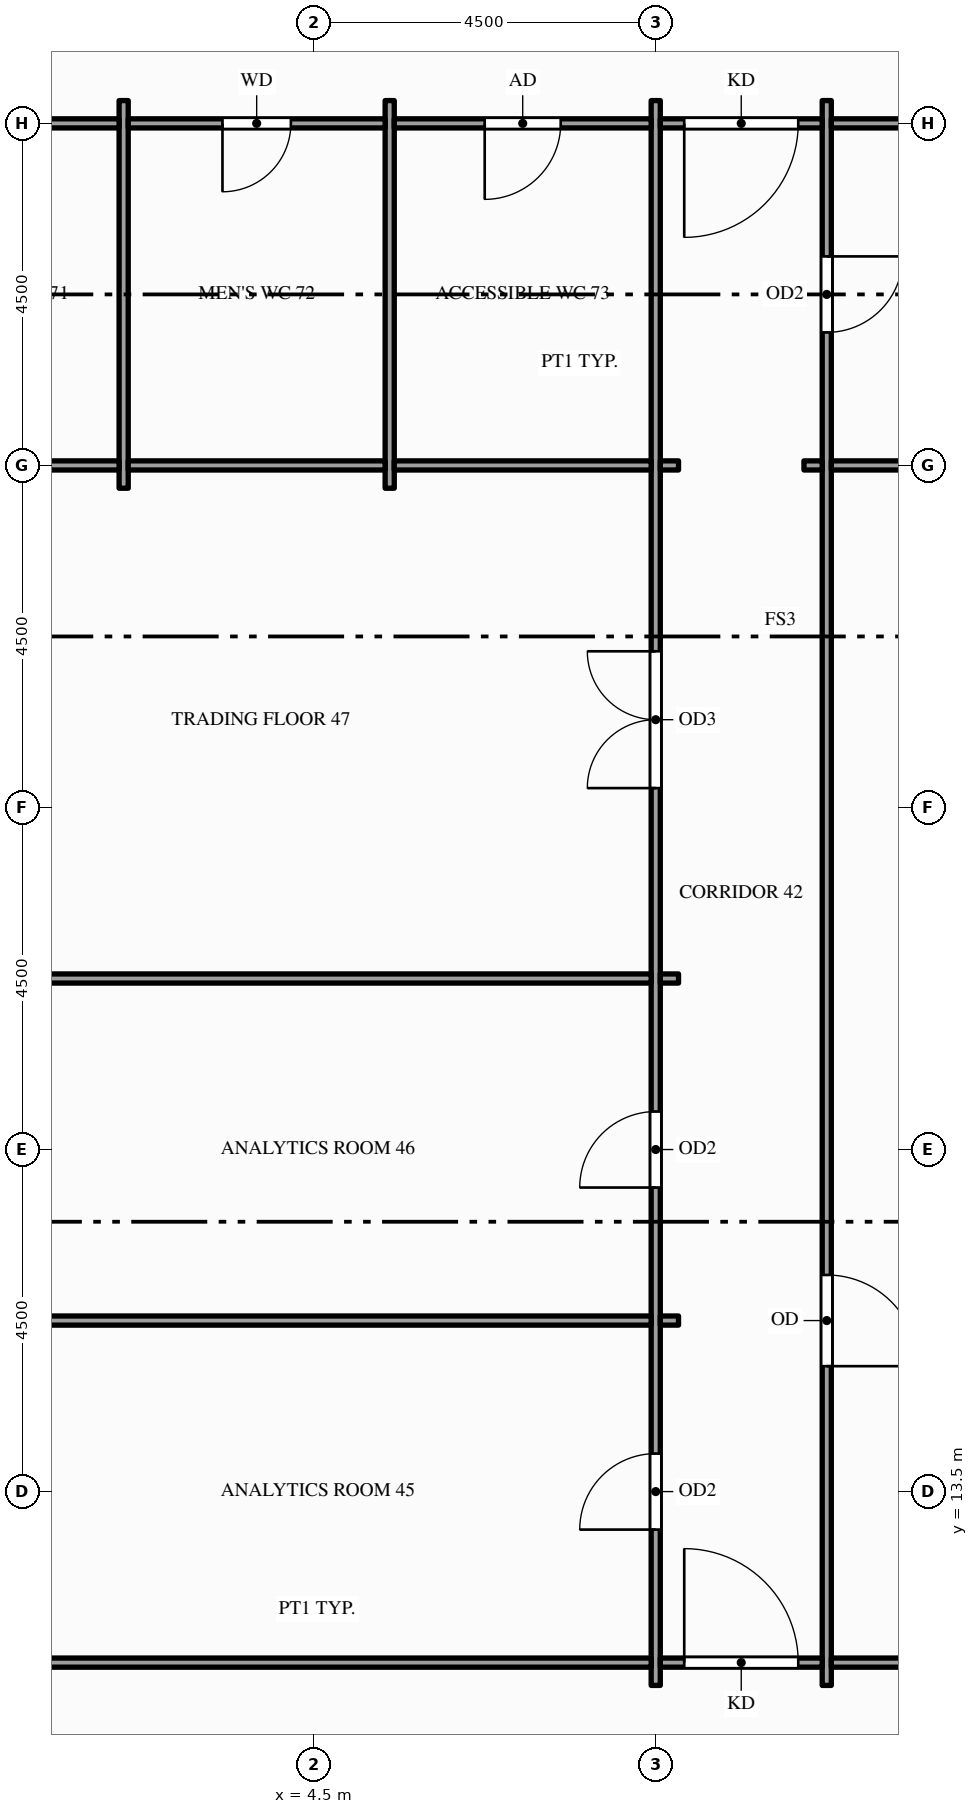
"""IFC4 building model, lengths in metres.
Left out: names, types, materials, properties, quantities, classifications, styles, units other than length and angle.
Written with IfcOpenShell. Run it as: python <this file> out.ifc"""

import sys

from ifc_helpers import new_model, si_unit, direction, frame, frame_2d, origin, place, context, subcontext, project, spatial, rectangle, extrude, element, fill, save


model = new_model("IFC4")
c1 = context("Model", 3, precision=1e-05, world=origin(), true_north=direction((0.0, 1.0)))
c2 = subcontext(c1, "Body", "Model", "MODEL_VIEW")
j1 = project(units=[si_unit("LENGTHUNIT", "METRE"), si_unit("PLANEANGLEUNIT", "RADIAN")], contexts=[c1])
p1 = place(None, origin())
s1 = spatial("IfcSite", under=j1, at=p1, CompositionType="ELEMENT")
p2 = place(p1, origin())
s2 = spatial("IfcBuilding", under=s1, at=p2, CompositionType="ELEMENT")
p3 = place(p2, frame((0.0, 0.0, 159.0)))
s3 = spatial("IfcBuildingStorey", under=s2, at=p3, CompositionType="ELEMENT", Elevation=159.0)
for number, where, z_axis, x_axis in (
    (1, (2.0, 26.7, 0.0), (0.0, 0.0, 1.0), (0.0, 1.0, 0.0)),
    (2, (5.5, 26.7, 0.0), (0.0, 0.0, 1.0), (0.0, 1.0, 0.0)),
):
    element("IfcWall", number, at=place(p3, frame(where, z_axis=z_axis, x_axis=x_axis)), inside=s3, PredefinedType="PARTITIONING", context=c2, shape_type="SweptSolid", body=[
        extrude(rectangle(XDim=5.1, YDim=0.12, at=frame_2d((2.55, 0.0))), origin(), (0.0, 0.0, 1.0), 3.85),
    ])
p4 = place(p3, frame((9.0, 10.95, 0.0), z_axis=(0.0, 0.0, 1.0), x_axis=(0.0, 1.0, 0.0)))
e3 = element("IfcWall", 3, at=p4, inside=s3, PredefinedType="PARTITIONING", context=c2, shape_type="SweptSolid", body=[
    extrude(rectangle(XDim=20.85, YDim=0.12, at=frame_2d((10.425, 0.0))), origin(), (0.0, 0.0, 1.0), 2.6),
])
p5 = place(p4, frame((2.05, 0.0, 0.0)))
e4 = element("IfcOpeningElement", 4, at=p5, cuts=e3, PredefinedType="OPENING", context=c2, shape_type="SweptSolid", body=[
    extrude(rectangle(XDim=1.0, YDim=2.1, at=frame_2d((0.5, 1.05))), frame((0.0, 0.07, 0.0), z_axis=(0.0, -1.0, 0.0), x_axis=(1.0, 0.0, 0.0)), (0.0, 0.0, 1.0), 0.14),
])
p6 = place(p4, frame((6.55, 0.0, 0.0)))
e5 = element("IfcOpeningElement", 5, at=p6, cuts=e3, PredefinedType="OPENING", context=c2, shape_type="SweptSolid", body=[
    extrude(rectangle(XDim=1.0, YDim=2.1, at=frame_2d((0.5, 1.05))), frame((0.0, 0.07, 0.0), z_axis=(0.0, -1.0, 0.0), x_axis=(1.0, 0.0, 0.0)), (0.0, 0.0, 1.0), 0.14),
])
p7 = place(p4, frame((11.805, 0.0, 0.0)))
e6 = element("IfcOpeningElement", 6, at=p7, cuts=e3, PredefinedType="OPENING", context=c2, shape_type="SweptSolid", body=[
    extrude(rectangle(XDim=1.8, YDim=2.1, at=frame_2d((0.9, 1.05))), frame((0.0, 0.07, 0.0), z_axis=(0.0, -1.0, 0.0), x_axis=(1.0, 0.0, 0.0)), (0.0, 0.0, 1.0), 0.14),
])
p8 = place(p3, frame((11.25, 10.95, 0.0), z_axis=(0.0, 0.0, 1.0), x_axis=(0.0, 1.0, 0.0)))
e7 = element("IfcWall", 7, at=p8, inside=s3, PredefinedType="PARTITIONING", context=c2, shape_type="SweptSolid", body=[
    extrude(rectangle(XDim=20.85, YDim=0.12, at=frame_2d((10.425, 0.0))), origin(), (0.0, 0.0, 1.0), 2.6),
])
p9 = place(p8, frame((17.8, 0.0, 0.0)))
e8 = element("IfcOpeningElement", 8, at=p9, cuts=e7, PredefinedType="OPENING", context=c2, shape_type="SweptSolid", body=[
    extrude(rectangle(XDim=1.0, YDim=2.1, at=frame_2d((0.5, 1.05))), frame((0.0, 0.07, 0.0), z_axis=(0.0, -1.0, 0.0), x_axis=(1.0, 0.0, 0.0)), (0.0, 0.0, 1.0), 0.14),
])
p10 = place(p8, frame((4.2, 0.0, 0.0)))
e9 = element("IfcOpeningElement", 9, at=p10, cuts=e7, PredefinedType="OPENING", context=c2, shape_type="SweptSolid", body=[
    extrude(rectangle(XDim=1.2, YDim=2.1, at=frame_2d((0.6, 1.05))), frame((0.0, 0.07, 0.0), z_axis=(0.0, -1.0, 0.0), x_axis=(1.0, 0.0, 0.0)), (0.0, 0.0, 1.0), 0.14),
])
p11 = place(p3, frame((0.15, 11.25, 0.0), z_axis=(0.0, 0.0, 1.0), x_axis=(1.0, 0.0, 0.0)))
e10 = element("IfcWall", 10, at=p11, inside=s3, PredefinedType="PARTITIONING", context=c2, shape_type="SweptSolid", body=[
    extrude(rectangle(XDim=8.79, YDim=0.12, at=frame_2d((4.395, 0.0))), origin(), (0.0, 0.0, 1.0), 2.87),
])
p12 = place(p3, frame((9.06, 11.25, 0.0), z_axis=(0.0, 0.0, 1.0), x_axis=(1.0, 0.0, 0.0)))
e11 = element("IfcWall", 11, at=p12, inside=s3, PredefinedType="PARTITIONING", context=c2, shape_type="SweptSolid", body=[
    extrude(rectangle(XDim=2.13, YDim=0.12, at=frame_2d((1.065, 0.0))), origin(), (0.0, 0.0, 1.0), 2.87),
])
p13 = place(p12, frame((0.315, 0.0, 0.0)))
e12 = element("IfcOpeningElement", 12, at=p13, cuts=e11, PredefinedType="OPENING", context=c2, shape_type="SweptSolid", body=[
    extrude(rectangle(XDim=1.5, YDim=2.1, at=frame_2d((0.75, 1.05))), frame((0.0, 0.07, 0.0), z_axis=(0.0, -1.0, 0.0), x_axis=(1.0, 0.0, 0.0)), (0.0, 0.0, 1.0), 0.14),
])
p14 = place(p3, frame((11.31, 11.25, 0.0), z_axis=(0.0, 0.0, 1.0), x_axis=(1.0, 0.0, 0.0)))
e13 = element("IfcWall", 13, at=p14, inside=s3, PredefinedType="PARTITIONING", context=c2, shape_type="SweptSolid", body=[
    extrude(rectangle(XDim=13.38, YDim=0.12, at=frame_2d((6.69, 0.0))), origin(), (0.0, 0.0, 1.0), 2.87),
])
p15 = place(p14, frame((3.54, 0.0, 0.0)))
e14 = element("IfcOpeningElement", 14, at=p15, cuts=e13, PredefinedType="OPENING", context=c2, shape_type="SweptSolid", body=[
    extrude(rectangle(XDim=1.8, YDim=2.1, at=frame_2d((0.9, 1.05))), frame((0.0, 0.07, 0.0), z_axis=(0.0, -1.0, 0.0), x_axis=(1.0, 0.0, 0.0)), (0.0, 0.0, 1.0), 0.14),
])
p16 = place(p3, frame((0.15, 15.75, 0.0), z_axis=(0.0, 0.0, 1.0), x_axis=(1.0, 0.0, 0.0)))
e15 = element("IfcWall", 15, at=p16, inside=s3, PredefinedType="PARTITIONING", context=c2, shape_type="SweptSolid", body=[
    extrude(rectangle(XDim=8.79, YDim=0.12, at=frame_2d((4.395, 0.0))), origin(), (0.0, 0.0, 1.0), 2.87),
])
p17 = place(p3, frame((9.06, 15.75, 0.0), z_axis=(0.0, 0.0, 1.0), x_axis=(1.0, 0.0, 0.0)))
e16 = element("IfcWall", 16, at=p17, inside=s3, PredefinedType="PARTITIONING", context=c2, shape_type="SweptSolid", body=[
    extrude(rectangle(XDim=0.24, YDim=0.12, at=frame_2d((0.12, 0.0))), origin(), (0.0, 0.0, 1.0), 2.87),
])
p18 = place(p3, frame((0.15, 20.25, 0.0), z_axis=(0.0, 0.0, 1.0), x_axis=(1.0, 0.0, 0.0)))
e17 = element("IfcWall", 17, at=p18, inside=s3, PredefinedType="PARTITIONING", context=c2, shape_type="SweptSolid", body=[
    extrude(rectangle(XDim=8.79, YDim=0.12, at=frame_2d((4.395, 0.0))), origin(), (0.0, 0.0, 1.0), 2.87),
])
p19 = place(p3, frame((9.06, 20.25, 0.0), z_axis=(0.0, 0.0, 1.0), x_axis=(1.0, 0.0, 0.0)))
e18 = element("IfcWall", 18, at=p19, inside=s3, PredefinedType="PARTITIONING", context=c2, shape_type="SweptSolid", body=[
    extrude(rectangle(XDim=0.24, YDim=0.12, at=frame_2d((0.12, 0.0))), origin(), (0.0, 0.0, 1.0), 2.87),
])
p20 = place(p3, frame((-1.35, 27.0, 0.0), z_axis=(0.0, 0.0, 1.0), x_axis=(1.0, 0.0, 0.0)))
e19 = element("IfcWall", 19, at=p20, inside=s3, PredefinedType="PARTITIONING", context=c2, shape_type="SweptSolid", body=[
    extrude(rectangle(XDim=3.29, YDim=0.12, at=frame_2d((1.645, 0.0))), origin(), (0.0, 0.0, 1.0), 2.87),
])
for number, where, z_axis, x_axis in (
    (20, (2.06, 27.0, 0.0), (0.0, 0.0, 1.0), (1.0, 0.0, 0.0)),
    (21, (5.56, 27.0, 0.0), (0.0, 0.0, 1.0), (1.0, 0.0, 0.0)),
):
    element("IfcWall", number, at=place(p3, frame(where, z_axis=z_axis, x_axis=x_axis)), inside=s3, PredefinedType="PARTITIONING", context=c2, shape_type="SweptSolid", body=[
        extrude(rectangle(XDim=3.38, YDim=0.12, at=frame_2d((1.69, 0.0))), origin(), (0.0, 0.0, 1.0), 2.87),
    ])
for number, where, z_axis, x_axis in (
    (22, (9.06, 27.0, 0.0), (0.0, 0.0, 1.0), (1.0, 0.0, 0.0)),
    (23, (10.95, 27.0, 0.0), (0.0, 0.0, 1.0), (1.0, 0.0, 0.0)),
):
    element("IfcWall", number, at=place(p3, frame(where, z_axis=z_axis, x_axis=x_axis)), inside=s3, PredefinedType="PARTITIONING", context=c2, shape_type="SweptSolid", body=[
        extrude(rectangle(XDim=0.24, YDim=0.12, at=frame_2d((0.12, 0.0))), origin(), (0.0, 0.0, 1.0), 2.87),
    ])
p21 = place(p3, frame((11.31, 27.0, 0.0), z_axis=(0.0, 0.0, 1.0), x_axis=(1.0, 0.0, 0.0)))
e24 = element("IfcWall", 24, at=p21, inside=s3, PredefinedType="PARTITIONING", context=c2, shape_type="SweptSolid", body=[
    extrude(rectangle(XDim=9.82, YDim=0.12, at=frame_2d((4.91, 0.0))), origin(), (0.0, 0.0, 1.0), 2.87),
])
p22 = place(p3, frame((-1.35, 31.5, 0.0), z_axis=(0.0, 0.0, 1.0), x_axis=(1.0, 0.0, 0.0)))
e25 = element("IfcWall", 25, at=p22, inside=s3, PredefinedType="PARTITIONING", context=c2, shape_type="SweptSolid", body=[
    extrude(rectangle(XDim=3.29, YDim=0.12, at=frame_2d((1.645, 0.0))), origin(), (0.0, 0.0, 1.0), 2.87),
])
p23 = place(p22, frame((0.85, 0.0, 0.0)))
e26 = element("IfcOpeningElement", 26, at=p23, cuts=e25, PredefinedType="OPENING", context=c2, shape_type="SweptSolid", body=[
    extrude(rectangle(XDim=0.9, YDim=2.1, at=frame_2d((0.45, 1.05))), frame((0.0, 0.07, 0.0), z_axis=(0.0, -1.0, 0.0), x_axis=(1.0, 0.0, 0.0)), (0.0, 0.0, 1.0), 0.14),
])
p24 = place(p3, frame((2.06, 31.5, 0.0), z_axis=(0.0, 0.0, 1.0), x_axis=(1.0, 0.0, 0.0)))
e27 = element("IfcWall", 27, at=p24, inside=s3, PredefinedType="PARTITIONING", context=c2, shape_type="SweptSolid", body=[
    extrude(rectangle(XDim=3.38, YDim=0.12, at=frame_2d((1.69, 0.0))), origin(), (0.0, 0.0, 1.0), 2.87),
])
p25 = place(p24, frame((1.24, 0.0, 0.0)))
e28 = element("IfcOpeningElement", 28, at=p25, cuts=e27, PredefinedType="OPENING", context=c2, shape_type="SweptSolid", body=[
    extrude(rectangle(XDim=0.9, YDim=2.1, at=frame_2d((0.45, 1.05))), frame((0.0, 0.07, 0.0), z_axis=(0.0, -1.0, 0.0), x_axis=(1.0, 0.0, 0.0)), (0.0, 0.0, 1.0), 0.14),
])
p26 = place(p3, frame((5.56, 31.5, 0.0), z_axis=(0.0, 0.0, 1.0), x_axis=(1.0, 0.0, 0.0)))
e29 = element("IfcWall", 29, at=p26, inside=s3, PredefinedType="PARTITIONING", context=c2, shape_type="SweptSolid", body=[
    extrude(rectangle(XDim=3.38, YDim=0.12, at=frame_2d((1.69, 0.0))), origin(), (0.0, 0.0, 1.0), 2.87),
])
p27 = place(p26, frame((1.19, 0.0, 0.0)))
e30 = element("IfcOpeningElement", 30, at=p27, cuts=e29, PredefinedType="OPENING", context=c2, shape_type="SweptSolid", body=[
    extrude(rectangle(XDim=1.0, YDim=2.1, at=frame_2d((0.5, 1.05))), frame((0.0, 0.07, 0.0), z_axis=(0.0, -1.0, 0.0), x_axis=(1.0, 0.0, 0.0)), (0.0, 0.0, 1.0), 0.14),
])
p28 = place(p3, frame((9.06, 31.5, 0.0), z_axis=(0.0, 0.0, 1.0), x_axis=(1.0, 0.0, 0.0)))
e31 = element("IfcWall", 31, at=p28, inside=s3, PredefinedType="PARTITIONING", context=c2, shape_type="SweptSolid", body=[
    extrude(rectangle(XDim=2.13, YDim=0.12, at=frame_2d((1.065, 0.0))), origin(), (0.0, 0.0, 1.0), 2.87),
])
p29 = place(p28, frame((0.315, 0.0, 0.0)))
e32 = element("IfcOpeningElement", 32, at=p29, cuts=e31, PredefinedType="OPENING", context=c2, shape_type="SweptSolid", body=[
    extrude(rectangle(XDim=1.5, YDim=2.1, at=frame_2d((0.75, 1.05))), frame((0.0, 0.07, 0.0), z_axis=(0.0, -1.0, 0.0), x_axis=(1.0, 0.0, 0.0)), (0.0, 0.0, 1.0), 0.14),
])
p30 = place(p3, frame((11.31, 31.5, 0.0), z_axis=(0.0, 0.0, 1.0), x_axis=(1.0, 0.0, 0.0)))
e33 = element("IfcWall", 33, at=p30, inside=s3, PredefinedType="PARTITIONING", context=c2, shape_type="SweptSolid", body=[
    extrude(rectangle(XDim=9.54, YDim=0.12, at=frame_2d((4.77, 0.0))), origin(), (0.0, 0.0, 1.0), 2.87),
])
p31 = place(p13, origin())
e34 = element("IfcDoor", 34, at=p31, inside=s3, OperationType="SINGLE_SWING_LEFT", PredefinedType="DOOR", context=c2, shape_type="SweptSolid", body=[
    extrude(rectangle(XDim=1.5, YDim=2.1, at=frame_2d((0.75, 1.05))), frame((0.0, 0.025, 0.0), z_axis=(0.0, -1.0, 0.0), x_axis=(1.0, 0.0, 0.0)), (0.0, 0.0, 1.0), 0.05),
])
fill(e12, e34)
p32 = place(p29, origin())
e35 = element("IfcDoor", 35, at=p32, inside=s3, OperationType="SINGLE_SWING_LEFT", PredefinedType="DOOR", context=c2, shape_type="SweptSolid", body=[
    extrude(rectangle(XDim=1.5, YDim=2.1, at=frame_2d((0.75, 1.05))), frame((0.0, 0.025, 0.0), z_axis=(0.0, -1.0, 0.0), x_axis=(1.0, 0.0, 0.0)), (0.0, 0.0, 1.0), 0.05),
])
fill(e32, e35)
p33 = place(p5, origin())
e36 = element("IfcDoor", 36, at=p33, inside=s3, OperationType="SINGLE_SWING_LEFT", PredefinedType="DOOR", context=c2, shape_type="SweptSolid", body=[
    extrude(rectangle(XDim=1.0, YDim=2.1, at=frame_2d((0.5, 1.05))), frame((0.0, 0.025, 0.0), z_axis=(0.0, -1.0, 0.0), x_axis=(1.0, 0.0, 0.0)), (0.0, 0.0, 1.0), 0.05),
])
fill(e4, e36)
p34 = place(p6, origin())
e37 = element("IfcDoor", 37, at=p34, inside=s3, OperationType="SINGLE_SWING_LEFT", PredefinedType="DOOR", context=c2, shape_type="SweptSolid", body=[
    extrude(rectangle(XDim=1.0, YDim=2.1, at=frame_2d((0.5, 1.05))), frame((0.0, 0.025, 0.0), z_axis=(0.0, -1.0, 0.0), x_axis=(1.0, 0.0, 0.0)), (0.0, 0.0, 1.0), 0.05),
])
fill(e5, e37)
p35 = place(p7, origin())
e38 = element("IfcDoor", 38, at=p35, inside=s3, OperationType="DOUBLE_DOOR_SINGLE_SWING", PredefinedType="DOOR", context=c2, shape_type="SweptSolid", body=[
    extrude(rectangle(XDim=1.8, YDim=2.1, at=frame_2d((0.9, 1.05))), frame((0.0, 0.025, 0.0), z_axis=(0.0, -1.0, 0.0), x_axis=(1.0, 0.0, 0.0)), (0.0, 0.0, 1.0), 0.05),
])
fill(e6, e38)
p36 = place(p25, origin())
e39 = element("IfcDoor", 39, at=p36, inside=s3, OperationType="SINGLE_SWING_LEFT", PredefinedType="DOOR", context=c2, shape_type="SweptSolid", body=[
    extrude(rectangle(XDim=0.9, YDim=2.1, at=frame_2d((0.45, 1.05))), frame((0.0, 0.025, 0.0), z_axis=(0.0, -1.0, 0.0), x_axis=(1.0, 0.0, 0.0)), (0.0, 0.0, 1.0), 0.05),
])
fill(e28, e39)
p37 = place(p27, origin())
e40 = element("IfcDoor", 40, at=p37, inside=s3, OperationType="SINGLE_SWING_LEFT", PredefinedType="DOOR", context=c2, shape_type="SweptSolid", body=[
    extrude(rectangle(XDim=1.0, YDim=2.1, at=frame_2d((0.5, 1.05))), frame((0.0, 0.025, 0.0), z_axis=(0.0, -1.0, 0.0), x_axis=(1.0, 0.0, 0.0)), (0.0, 0.0, 1.0), 0.05),
])
fill(e30, e40)
p38 = place(p9, origin())
e41 = element("IfcDoor", 41, at=p38, inside=s3, OperationType="SINGLE_SWING_RIGHT", PredefinedType="DOOR", context=c2, shape_type="SweptSolid", body=[
    extrude(rectangle(XDim=1.0, YDim=2.1, at=frame_2d((0.5, 1.05))), frame((0.0, 0.025, 0.0), z_axis=(0.0, -1.0, 0.0), x_axis=(1.0, 0.0, 0.0)), (0.0, 0.0, 1.0), 0.05),
])
fill(e8, e41)
p39 = place(p10, origin())
e42 = element("IfcDoor", 42, at=p39, inside=s3, OperationType="SINGLE_SWING_LEFT", PredefinedType="DOOR", context=c2, shape_type="SweptSolid", body=[
    extrude(rectangle(XDim=1.2, YDim=2.1, at=frame_2d((0.6, 1.05))), frame((0.0, 0.025, 0.0), z_axis=(0.0, -1.0, 0.0), x_axis=(1.0, 0.0, 0.0)), (0.0, 0.0, 1.0), 0.05),
])
fill(e9, e42)
save(model, sys.argv[1])
